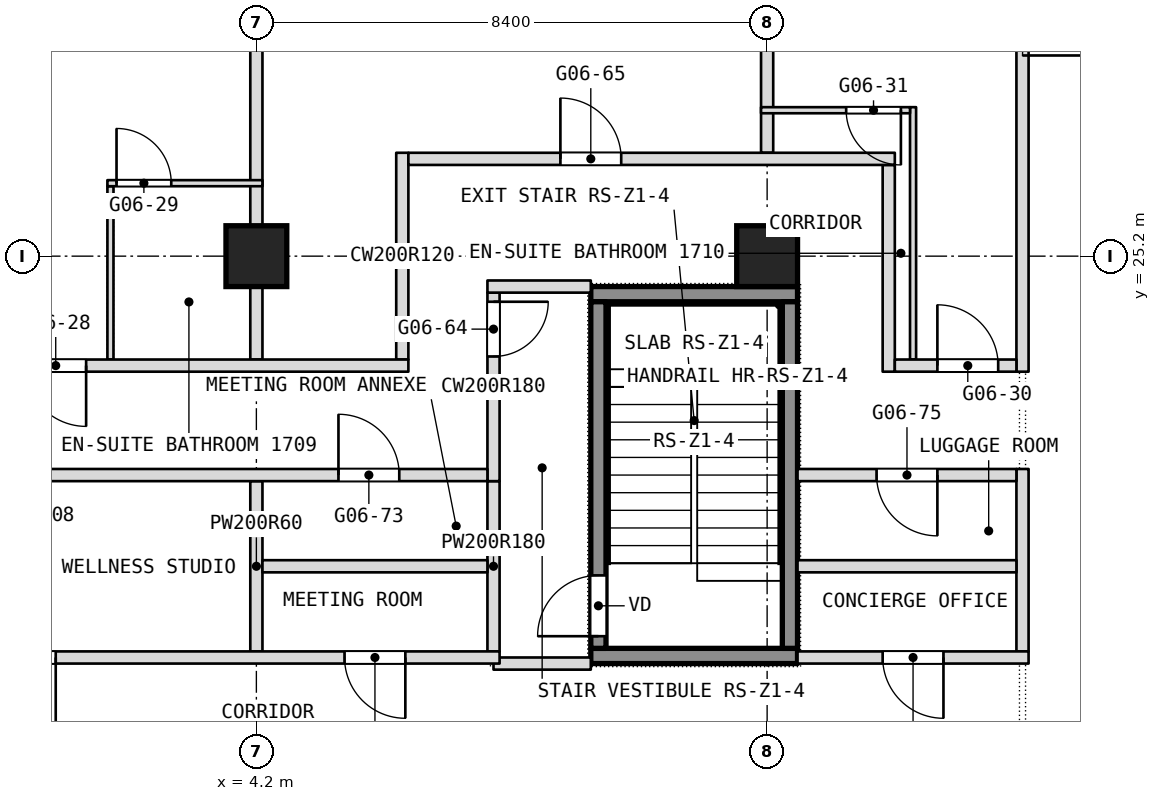
"""IFC4 building model, lengths in metres.
Left out: names, types, materials, properties, quantities, classifications, styles, units other than length and angle.
Written with IfcOpenShell. Run it as: python <this file> out.ifc"""

import sys

from ifc_helpers import new_model, si_unit, direction, frame, frame_2d, origin, origin_2d, place, context, subcontext, project, spatial, rectangle, extrude, element, fill, save


model = new_model("IFC4")
c1 = context("Model", 3, precision=1e-05, world=origin(), true_north=direction((0.0, 1.0)))
c2 = subcontext(c1, "Body", "Model", "MODEL_VIEW")
j1 = project(units=[si_unit("LENGTHUNIT", "METRE"), si_unit("PLANEANGLEUNIT", "RADIAN")], contexts=[c1])
p1 = place(None, origin())
s1 = spatial("IfcSite", under=j1, at=p1, CompositionType="ELEMENT")
p2 = place(p1, origin())
s2 = spatial("IfcBuilding", under=s1, at=p2, CompositionType="ELEMENT")
p3 = place(p2, frame((0.0, 0.0, 76.1)))
s3 = spatial("IfcBuildingStorey", under=s2, at=p3, CompositionType="ELEMENT", Elevation=76.1)
for number, where, z_axis, x_axis in (
    (1, (4.2, 25.2, 0.0), (0.0, 0.0, 1.0), (1.0, 0.0, 0.0)),
    (2, (12.6, 25.2, 0.0), (0.0, 0.0, 1.0), (1.0, 0.0, 0.0)),
):
    element("IfcColumn", number, at=place(p3, frame(where, z_axis=z_axis, x_axis=x_axis)), inside=s3, PredefinedType="COLUMN", context=c2, shape_type="SweptSolid", body=[
        extrude(rectangle(XDim=1.0, YDim=1.0, at=origin_2d()), origin(), (0.0, 0.0, 1.0), 3.6),
    ])
p4 = place(p3, frame((16.8, 18.7, 0.0), z_axis=(0.0, 0.0, 1.0), x_axis=(0.0, 1.0, 0.0)))
e3 = element("IfcWall", 3, at=p4, inside=s3, PredefinedType="PARTITIONING", context=c2, shape_type="SweptSolid", body=[
    extrude(rectangle(XDim=3.0, YDim=0.2, at=frame_2d((1.5, 0.0))), origin(), (0.0, 0.0, 1.0), 3.34),
])
p5 = place(p3, frame((16.8, 23.3, 0.0), z_axis=(0.0, 0.0, 1.0), x_axis=(0.0, 1.0, 0.0)))
e4 = element("IfcWall", 4, at=p5, inside=s3, PredefinedType="PARTITIONING", context=c2, shape_type="SweptSolid", body=[
    extrude(rectangle(XDim=10.24, YDim=0.2, at=frame_2d((5.12, 0.0))), origin(), (0.0, 0.0, 1.0), 3.34),
])
p6 = place(p3, frame((15.0, 23.5, 0.0), z_axis=(0.0, 0.0, 1.0), x_axis=(0.0, 1.0, 0.0)))
e5 = element("IfcWall", 5, at=p6, inside=s3, PredefinedType="PARTITIONING", context=c2, shape_type="SweptSolid", body=[
    extrude(rectangle(XDim=4.15, YDim=0.1, at=frame_2d((2.075, 0.0))), origin(), (0.0, 0.0, 1.0), 3.34),
])
p7 = place(p3, frame((14.6, 23.3, 0.0), z_axis=(0.0, 0.0, 1.0), x_axis=(0.0, 1.0, 0.0)))
e6 = element("IfcWall", 6, at=p7, inside=s3, PredefinedType="PARTITIONING", context=c2, shape_type="SweptSolid", body=[
    extrude(rectangle(XDim=3.4, YDim=0.2, at=frame_2d((1.7, 0.0))), origin(), (0.0, 0.0, 1.0), 3.34),
])
p8 = place(p3, frame((12.6, 26.9, 0.0), z_axis=(0.0, 0.0, 1.0), x_axis=(0.0, 1.0, 0.0)))
e7 = element("IfcWall", 7, at=p8, inside=s3, PredefinedType="PARTITIONING", context=c2, shape_type="SweptSolid", body=[
    extrude(rectangle(XDim=6.64, YDim=0.2, at=frame_2d((3.32, 0.0))), origin(), (0.0, 0.0, 1.0), 3.34),
])
p9 = place(p3, frame((8.1, 18.7, 0.0), z_axis=(0.0, 0.0, 1.0), x_axis=(0.0, 1.0, 0.0)))
e8 = element("IfcWall", 8, at=p9, inside=s3, PredefinedType="PARTITIONING", context=c2, shape_type="SweptSolid", body=[
    extrude(rectangle(XDim=2.8, YDim=0.2, at=frame_2d((1.4, 0.0))), origin(), (0.0, 0.0, 1.0), 3.34),
])
p10 = place(p3, frame((8.1, 21.5, 0.0), z_axis=(0.0, 0.0, 1.0), x_axis=(0.0, 1.0, 0.0)))
e9 = element("IfcWall", 9, at=p10, inside=s3, PredefinedType="PARTITIONING", context=c2, shape_type="SweptSolid", body=[
    extrude(rectangle(XDim=3.1, YDim=0.2, at=frame_2d((1.55, 0.0))), origin(), (0.0, 0.0, 1.0), 3.34),
])
p11 = place(p10, frame((2.05, 0.0, 0.0)))
e10 = element("IfcOpeningElement", 10, at=p11, cuts=e9, PredefinedType="OPENING", context=c2, shape_type="SweptSolid", body=[
    extrude(rectangle(XDim=0.9, YDim=2.1, at=frame_2d((0.45, 1.05))), frame((0.0, 0.1, 0.0), z_axis=(0.0, -1.0, 0.0), x_axis=(1.0, 0.0, 0.0)), (0.0, 0.0, 1.0), 0.2),
])
p12 = place(p3, frame((6.6, 23.5, 0.0), z_axis=(0.0, 0.0, 1.0), x_axis=(0.0, 1.0, 0.0)))
e11 = element("IfcWall", 11, at=p12, inside=s3, PredefinedType="PARTITIONING", context=c2, shape_type="SweptSolid", body=[
    extrude(rectangle(XDim=3.4, YDim=0.2, at=frame_2d((1.7, 0.0))), origin(), (0.0, 0.0, 1.0), 3.34),
])
p13 = place(p3, frame((4.2, 18.7, 0.0), z_axis=(0.0, 0.0, 1.0), x_axis=(0.0, 1.0, 0.0)))
e12 = element("IfcWall", 12, at=p13, inside=s3, PredefinedType="PARTITIONING", context=c2, shape_type="SweptSolid", body=[
    extrude(rectangle(XDim=2.8, YDim=0.2, at=frame_2d((1.4, 0.0))), origin(), (0.0, 0.0, 1.0), 3.34),
])
p14 = place(p3, frame((4.2, 23.5, 0.0), z_axis=(0.0, 0.0, 1.0), x_axis=(0.0, 1.0, 0.0)))
e13 = element("IfcWall", 13, at=p14, inside=s3, PredefinedType="PARTITIONING", context=c2, shape_type="SweptSolid", body=[
    extrude(rectangle(XDim=10.04, YDim=0.2, at=frame_2d((5.02, 0.0))), origin(), (0.0, 0.0, 1.0), 3.34),
])
p15 = place(p3, frame((1.8, 23.5, 0.0), z_axis=(0.0, 0.0, 1.0), x_axis=(0.0, 1.0, 0.0)))
e14 = element("IfcWall", 14, at=p15, inside=s3, PredefinedType="PARTITIONING", context=c2, shape_type="SweptSolid", body=[
    extrude(rectangle(XDim=2.85, YDim=0.1, at=frame_2d((1.425, 0.0))), origin(), (0.0, 0.0, 1.0), 3.34),
])
p16 = place(p3, frame((8.1, 18.5, 0.0), z_axis=(0.0, 0.0, 1.0), x_axis=(1.0, 0.0, 0.0)))
e15 = element("IfcWall", 15, at=p16, inside=s3, PredefinedType="PARTITIONING", context=c2, shape_type="SweptSolid", body=[
    extrude(rectangle(XDim=1.6, YDim=0.2, at=frame_2d((0.8, 0.0))), origin(), (0.0, 0.0, 1.0), 3.34),
])
p17 = place(p3, frame((-16.9, 18.6, 0.0), z_axis=(0.0, 0.0, 1.0), x_axis=(1.0, 0.0, 0.0)))
e16 = element("IfcWall", 16, at=p17, inside=s3, PredefinedType="PARTITIONING", context=c2, shape_type="SweptSolid", body=[
    extrude(rectangle(XDim=25.1, YDim=0.2, at=frame_2d((12.55, 0.0))), origin(), (0.0, 0.0, 1.0), 3.34),
])
p18 = place(p17, frame((16.0, 0.0, 0.0)))
e17 = element("IfcOpeningElement", 17, at=p18, cuts=e16, PredefinedType="OPENING", context=c2, shape_type="SweptSolid", body=[
    extrude(rectangle(XDim=1.8, YDim=2.1, at=frame_2d((0.9, 1.05))), frame((0.0, 0.1, 0.0), z_axis=(0.0, -1.0, 0.0), x_axis=(1.0, 0.0, 0.0)), (0.0, 0.0, 1.0), 0.2),
])
p19 = place(p17, frame((5.9, 0.0, 0.0)))
e18 = element("IfcOpeningElement", 18, at=p19, cuts=e16, PredefinedType="OPENING", context=c2, shape_type="SweptSolid", body=[
    extrude(rectangle(XDim=1.0, YDim=2.1, at=frame_2d((0.5, 1.05))), frame((0.0, 0.1, 0.0), z_axis=(0.0, -1.0, 0.0), x_axis=(1.0, 0.0, 0.0)), (0.0, 0.0, 1.0), 0.2),
])
p20 = place(p17, frame((10.1, 0.0, 0.0)))
e19 = element("IfcOpeningElement", 19, at=p20, cuts=e16, PredefinedType="OPENING", context=c2, shape_type="SweptSolid", body=[
    extrude(rectangle(XDim=1.0, YDim=2.1, at=frame_2d((0.5, 1.05))), frame((0.0, 0.1, 0.0), z_axis=(0.0, -1.0, 0.0), x_axis=(1.0, 0.0, 0.0)), (0.0, 0.0, 1.0), 0.2),
])
p21 = place(p17, frame((1.7, 0.0, 0.0)))
e20 = element("IfcOpeningElement", 20, at=p21, cuts=e16, PredefinedType="OPENING", context=c2, shape_type="SweptSolid", body=[
    extrude(rectangle(XDim=1.0, YDim=2.1, at=frame_2d((0.5, 1.05))), frame((0.0, 0.1, 0.0), z_axis=(0.0, -1.0, 0.0), x_axis=(1.0, 0.0, 0.0)), (0.0, 0.0, 1.0), 0.2),
])
p22 = place(p17, frame((22.55, 0.0, 0.0)))
e21 = element("IfcOpeningElement", 21, at=p22, cuts=e16, PredefinedType="OPENING", context=c2, shape_type="SweptSolid", body=[
    extrude(rectangle(XDim=1.0, YDim=2.1, at=frame_2d((0.5, 1.05))), frame((0.0, 0.1, 0.0), z_axis=(0.0, -1.0, 0.0), x_axis=(1.0, 0.0, 0.0)), (0.0, 0.0, 1.0), 0.2),
])
p23 = place(p3, frame((13.1, 18.6, 0.0), z_axis=(0.0, 0.0, 1.0), x_axis=(1.0, 0.0, 0.0)))
e22 = element("IfcWall", 22, at=p23, inside=s3, PredefinedType="PARTITIONING", context=c2, shape_type="SweptSolid", body=[
    extrude(rectangle(XDim=3.8, YDim=0.2, at=frame_2d((1.9, 0.0))), origin(), (0.0, 0.0, 1.0), 3.34),
])
p24 = place(p23, frame((1.4, 0.0, 0.0)))
e23 = element("IfcOpeningElement", 23, at=p24, cuts=e22, PredefinedType="OPENING", context=c2, shape_type="SweptSolid", body=[
    extrude(rectangle(XDim=1.0, YDim=2.1, at=frame_2d((0.5, 1.05))), frame((0.0, 0.1, 0.0), z_axis=(0.0, -1.0, 0.0), x_axis=(1.0, 0.0, 0.0)), (0.0, 0.0, 1.0), 0.2),
])
p25 = place(p3, frame((4.3, 20.1, 0.0), z_axis=(0.0, 0.0, 1.0), x_axis=(1.0, 0.0, 0.0)))
e24 = element("IfcWall", 24, at=p25, inside=s3, PredefinedType="PARTITIONING", context=c2, shape_type="SweptSolid", body=[
    extrude(rectangle(XDim=3.7, YDim=0.2, at=frame_2d((1.85, 0.0))), origin(), (0.0, 0.0, 1.0), 3.34),
])
p26 = place(p3, frame((13.1, 20.1, 0.0), z_axis=(0.0, 0.0, 1.0), x_axis=(1.0, 0.0, 0.0)))
e25 = element("IfcWall", 25, at=p26, inside=s3, PredefinedType="PARTITIONING", context=c2, shape_type="SweptSolid", body=[
    extrude(rectangle(XDim=3.6, YDim=0.2, at=frame_2d((1.8, 0.0))), origin(), (0.0, 0.0, 1.0), 3.34),
])
p27 = place(p3, frame((-16.7, 21.6, 0.0), z_axis=(0.0, 0.0, 1.0), x_axis=(1.0, 0.0, 0.0)))
e26 = element("IfcWall", 26, at=p27, inside=s3, PredefinedType="PARTITIONING", context=c2, shape_type="SweptSolid", body=[
    extrude(rectangle(XDim=24.7, YDim=0.2, at=frame_2d((12.35, 0.0))), origin(), (0.0, 0.0, 1.0), 3.34),
])
p28 = place(p27, frame((1.6, 0.0, 0.0)))
e27 = element("IfcOpeningElement", 27, at=p28, cuts=e26, PredefinedType="OPENING", context=c2, shape_type="SweptSolid", body=[
    extrude(rectangle(XDim=1.0, YDim=2.1, at=frame_2d((0.5, 1.05))), frame((0.0, 0.1, 0.0), z_axis=(0.0, -1.0, 0.0), x_axis=(1.0, 0.0, 0.0)), (0.0, 0.0, 1.0), 0.2),
])
p29 = place(p27, frame((22.25, 0.0, 0.0)))
e28 = element("IfcOpeningElement", 28, at=p29, cuts=e26, PredefinedType="OPENING", context=c2, shape_type="SweptSolid", body=[
    extrude(rectangle(XDim=1.0, YDim=2.1, at=frame_2d((0.5, 1.05))), frame((0.0, 0.1, 0.0), z_axis=(0.0, -1.0, 0.0), x_axis=(1.0, 0.0, 0.0)), (0.0, 0.0, 1.0), 0.2),
])
p30 = place(p3, frame((13.1, 21.6, 0.0), z_axis=(0.0, 0.0, 1.0), x_axis=(1.0, 0.0, 0.0)))
e29 = element("IfcWall", 29, at=p30, inside=s3, PredefinedType="PARTITIONING", context=c2, shape_type="SweptSolid", body=[
    extrude(rectangle(XDim=3.6, YDim=0.2, at=frame_2d((1.8, 0.0))), origin(), (0.0, 0.0, 1.0), 3.34),
])
p31 = place(p30, frame((1.3, 0.0, 0.0)))
e30 = element("IfcOpeningElement", 30, at=p31, cuts=e29, PredefinedType="OPENING", context=c2, shape_type="SweptSolid", body=[
    extrude(rectangle(XDim=1.0, YDim=2.1, at=frame_2d((0.5, 1.05))), frame((0.0, 0.1, 0.0), z_axis=(0.0, -1.0, 0.0), x_axis=(1.0, 0.0, 0.0)), (0.0, 0.0, 1.0), 0.2),
])
p32 = place(p3, frame((-16.7, 23.4, 0.0), z_axis=(0.0, 0.0, 1.0), x_axis=(1.0, 0.0, 0.0)))
e31 = element("IfcWall", 31, at=p32, inside=s3, PredefinedType="PARTITIONING", context=c2, shape_type="SweptSolid", body=[
    extrude(rectangle(XDim=23.4, YDim=0.2, at=frame_2d((11.7, 0.0))), origin(), (0.0, 0.0, 1.0), 3.34),
])
p33 = place(p32, frame((2.4, 0.0, 0.0)))
e32 = element("IfcOpeningElement", 32, at=p33, cuts=e31, PredefinedType="OPENING", context=c2, shape_type="SweptSolid", body=[
    extrude(rectangle(XDim=0.9, YDim=2.1, at=frame_2d((0.45, 1.05))), frame((0.0, 0.1, 0.0), z_axis=(0.0, -1.0, 0.0), x_axis=(1.0, 0.0, 0.0)), (0.0, 0.0, 1.0), 0.2),
])
p34 = place(p32, frame((5.65, 0.0, 0.0)))
e33 = element("IfcOpeningElement", 33, at=p34, cuts=e31, PredefinedType="OPENING", context=c2, shape_type="SweptSolid", body=[
    extrude(rectangle(XDim=1.1, YDim=2.1, at=frame_2d((0.55, 1.05))), frame((0.0, 0.1, 0.0), z_axis=(0.0, -1.0, 0.0), x_axis=(1.0, 0.0, 0.0)), (0.0, 0.0, 1.0), 0.2),
])
p35 = place(p32, frame((15.3, 0.0, 0.0)))
e34 = element("IfcOpeningElement", 34, at=p35, cuts=e31, PredefinedType="OPENING", context=c2, shape_type="SweptSolid", body=[
    extrude(rectangle(XDim=1.0, YDim=2.1, at=frame_2d((0.5, 1.05))), frame((0.0, 0.1, 0.0), z_axis=(0.0, -1.0, 0.0), x_axis=(1.0, 0.0, 0.0)), (0.0, 0.0, 1.0), 0.2),
])
p36 = place(p32, frame((17.1, 0.0, 0.0)))
e35 = element("IfcOpeningElement", 35, at=p36, cuts=e31, PredefinedType="OPENING", context=c2, shape_type="SweptSolid", body=[
    extrude(rectangle(XDim=1.0, YDim=2.1, at=frame_2d((0.5, 1.05))), frame((0.0, 0.1, 0.0), z_axis=(0.0, -1.0, 0.0), x_axis=(1.0, 0.0, 0.0)), (0.0, 0.0, 1.0), 0.2),
])
p37 = place(p3, frame((14.7, 23.4, 0.0), z_axis=(0.0, 0.0, 1.0), x_axis=(1.0, 0.0, 0.0)))
e36 = element("IfcWall", 36, at=p37, inside=s3, PredefinedType="PARTITIONING", context=c2, shape_type="SweptSolid", body=[
    extrude(rectangle(XDim=2.0, YDim=0.2, at=frame_2d((1.0, 0.0))), origin(), (0.0, 0.0, 1.0), 3.34),
])
p38 = place(p37, frame((0.7, 0.0, 0.0)))
e37 = element("IfcOpeningElement", 37, at=p38, cuts=e36, PredefinedType="OPENING", context=c2, shape_type="SweptSolid", body=[
    extrude(rectangle(XDim=1.0, YDim=2.1, at=frame_2d((0.5, 1.05))), frame((0.0, 0.1, 0.0), z_axis=(0.0, -1.0, 0.0), x_axis=(1.0, 0.0, 0.0)), (0.0, 0.0, 1.0), 0.2),
])
p39 = place(p3, frame((8.0, 24.7, 0.0), z_axis=(0.0, 0.0, 1.0), x_axis=(1.0, 0.0, 0.0)))
e38 = element("IfcWall", 38, at=p39, inside=s3, PredefinedType="PARTITIONING", context=c2, shape_type="SweptSolid", body=[
    extrude(rectangle(XDim=1.7, YDim=0.2, at=frame_2d((0.85, 0.0))), origin(), (0.0, 0.0, 1.0), 3.34),
])
p40 = place(p3, frame((1.75, 26.4, 0.0), z_axis=(0.0, 0.0, 1.0), x_axis=(1.0, 0.0, 0.0)))
e39 = element("IfcWall", 39, at=p40, inside=s3, PredefinedType="PARTITIONING", context=c2, shape_type="SweptSolid", body=[
    extrude(rectangle(XDim=2.55, YDim=0.1, at=frame_2d((1.275, 0.0))), origin(), (0.0, 0.0, 1.0), 3.34),
])
p41 = place(p40, frame((0.15, 0.0, 0.0)))
e40 = element("IfcOpeningElement", 40, at=p41, cuts=e39, PredefinedType="OPENING", context=c2, shape_type="SweptSolid", body=[
    extrude(rectangle(XDim=0.9, YDim=2.1, at=frame_2d((0.45, 1.05))), frame((0.0, 0.05, 0.0), z_axis=(0.0, -1.0, 0.0), x_axis=(1.0, 0.0, 0.0)), (0.0, 0.0, 1.0), 0.1),
])
p42 = place(p3, frame((6.7, 26.8, 0.0), z_axis=(0.0, 0.0, 1.0), x_axis=(1.0, 0.0, 0.0)))
e41 = element("IfcWall", 41, at=p42, inside=s3, PredefinedType="PARTITIONING", context=c2, shape_type="SweptSolid", body=[
    extrude(rectangle(XDim=8.0, YDim=0.2, at=frame_2d((4.0, 0.0))), origin(), (0.0, 0.0, 1.0), 3.34),
])
p43 = place(p42, frame((2.5, 0.0, 0.0)))
e42 = element("IfcOpeningElement", 42, at=p43, cuts=e41, PredefinedType="OPENING", context=c2, shape_type="SweptSolid", body=[
    extrude(rectangle(XDim=1.0, YDim=2.1, at=frame_2d((0.5, 1.05))), frame((0.0, 0.1, 0.0), z_axis=(0.0, -1.0, 0.0), x_axis=(1.0, 0.0, 0.0)), (0.0, 0.0, 1.0), 0.2),
])
p44 = place(p3, frame((12.5, 27.6, 0.0), z_axis=(0.0, 0.0, 1.0), x_axis=(1.0, 0.0, 0.0)))
e43 = element("IfcWall", 43, at=p44, inside=s3, PredefinedType="PARTITIONING", context=c2, shape_type="SweptSolid", body=[
    extrude(rectangle(XDim=2.45, YDim=0.1, at=frame_2d((1.225, 0.0))), origin(), (0.0, 0.0, 1.0), 3.34),
])
p45 = place(p44, frame((1.4, 0.0, 0.0)))
e44 = element("IfcOpeningElement", 44, at=p45, cuts=e43, PredefinedType="OPENING", context=c2, shape_type="SweptSolid", body=[
    extrude(rectangle(XDim=0.9, YDim=2.1, at=frame_2d((0.45, 1.05))), frame((0.0, 0.05, 0.0), z_axis=(0.0, -1.0, 0.0), x_axis=(1.0, 0.0, 0.0)), (0.0, 0.0, 1.0), 0.1),
])
for number, where, z_axis, x_axis in (
    (45, (9.7, 18.625, 0.1), (0.0, 0.0, 1.0), (1.0, 0.0, 0.0)),
    (46, (9.7, 24.575, 0.1), (0.0, 0.0, 1.0), (1.0, 0.0, 0.0)),
):
    element("IfcWall", number, at=place(p3, frame(where, z_axis=z_axis, x_axis=x_axis)), inside=s3, PredefinedType="SHEAR", context=c2, shape_type="SweptSolid", body=[
        extrude(rectangle(XDim=3.4, YDim=0.25, at=frame_2d((1.7, 0.0))), origin(), (0.0, 0.0, 1.0), 3.6),
    ])
p46 = place(p3, frame((9.825, 18.75, 0.1), z_axis=(0.0, 0.0, 1.0), x_axis=(0.0, 1.0, 0.0)))
e47 = element("IfcWall", 47, at=p46, inside=s3, PredefinedType="SHEAR", context=c2, shape_type="SweptSolid", body=[
    extrude(rectangle(XDim=5.7, YDim=0.25, at=frame_2d((2.85, 0.0))), origin(), (0.0, 0.0, 1.0), 3.6),
])
p47 = place(p46, frame((0.2, 0.0, 0.0)))
e48 = element("IfcOpeningElement", 48, at=p47, cuts=e47, PredefinedType="OPENING", context=c2, shape_type="SweptSolid", body=[
    extrude(rectangle(XDim=1.0, YDim=2.1, at=frame_2d((0.5, 1.05))), frame((0.0, 0.125, 0.0), z_axis=(0.0, -1.0, 0.0), x_axis=(1.0, 0.0, 0.0)), (0.0, 0.0, 1.0), 0.25),
])
p48 = place(p3, frame((12.975, 18.75, 0.1), z_axis=(0.0, 0.0, 1.0), x_axis=(0.0, 1.0, 0.0)))
e49 = element("IfcWall", 49, at=p48, inside=s3, PredefinedType="SHEAR", context=c2, shape_type="SweptSolid", body=[
    extrude(rectangle(XDim=5.7, YDim=0.25, at=frame_2d((2.85, 0.0))), origin(), (0.0, 0.0, 1.0), 3.6),
])
p49 = place(p11, origin())
e50 = element("IfcDoor", 50, at=p49, inside=s3, OperationType="SINGLE_SWING_LEFT", PredefinedType="DOOR", context=c2, shape_type="SweptSolid", body=[
    extrude(rectangle(XDim=0.9, YDim=2.1, at=frame_2d((0.45, 1.05))), frame((0.0, 0.025, 0.0), z_axis=(0.0, -1.0, 0.0), x_axis=(1.0, 0.0, 0.0)), (0.0, 0.0, 1.0), 0.05),
])
fill(e10, e50)
p50 = place(p18, origin())
e51 = element("IfcDoor", 51, at=p50, inside=s3, OperationType="DOUBLE_DOOR_SINGLE_SWING", PredefinedType="DOOR", context=c2, shape_type="SweptSolid", body=[
    extrude(rectangle(XDim=1.8, YDim=2.1, at=frame_2d((0.9, 1.05))), frame((0.0, 0.025, 0.0), z_axis=(0.0, -1.0, 0.0), x_axis=(1.0, 0.0, 0.0)), (0.0, 0.0, 1.0), 0.05),
])
fill(e17, e51)
p51 = place(p22, origin())
e52 = element("IfcDoor", 52, at=p51, inside=s3, OperationType="SINGLE_SWING_RIGHT", PredefinedType="DOOR", context=c2, shape_type="SweptSolid", body=[
    extrude(rectangle(XDim=1.0, YDim=2.1, at=frame_2d((0.5, 1.05))), frame((0.0, 0.025, 0.0), z_axis=(0.0, -1.0, 0.0), x_axis=(1.0, 0.0, 0.0)), (0.0, 0.0, 1.0), 0.05),
])
fill(e21, e52)
p52 = place(p24, origin())
e53 = element("IfcDoor", 53, at=p52, inside=s3, OperationType="SINGLE_SWING_LEFT", PredefinedType="DOOR", context=c2, shape_type="SweptSolid", body=[
    extrude(rectangle(XDim=1.0, YDim=2.1, at=frame_2d((0.5, 1.05))), frame((0.0, 0.025, 0.0), z_axis=(0.0, -1.0, 0.0), x_axis=(1.0, 0.0, 0.0)), (0.0, 0.0, 1.0), 0.05),
])
fill(e23, e53)
p53 = place(p29, origin())
e54 = element("IfcDoor", 54, at=p53, inside=s3, OperationType="SINGLE_SWING_LEFT", PredefinedType="DOOR", context=c2, shape_type="SweptSolid", body=[
    extrude(rectangle(XDim=1.0, YDim=2.1, at=frame_2d((0.5, 1.05))), frame((0.0, 0.025, 0.0), z_axis=(0.0, -1.0, 0.0), x_axis=(1.0, 0.0, 0.0)), (0.0, 0.0, 1.0), 0.05),
])
fill(e28, e54)
p54 = place(p31, origin())
e55 = element("IfcDoor", 55, at=p54, inside=s3, OperationType="SINGLE_SWING_RIGHT", PredefinedType="DOOR", context=c2, shape_type="SweptSolid", body=[
    extrude(rectangle(XDim=1.0, YDim=2.1, at=frame_2d((0.5, 1.05))), frame((0.0, 0.025, 0.0), z_axis=(0.0, -1.0, 0.0), x_axis=(1.0, 0.0, 0.0)), (0.0, 0.0, 1.0), 0.05),
])
fill(e30, e55)
p55 = place(p36, origin())
e56 = element("IfcDoor", 56, at=p55, inside=s3, OperationType="SINGLE_SWING_LEFT", PredefinedType="DOOR", context=c2, shape_type="SweptSolid", body=[
    extrude(rectangle(XDim=1.0, YDim=2.1, at=frame_2d((0.5, 1.05))), frame((0.0, 0.025, 0.0), z_axis=(0.0, -1.0, 0.0), x_axis=(1.0, 0.0, 0.0)), (0.0, 0.0, 1.0), 0.05),
])
fill(e35, e56)
p56 = place(p38, origin())
e57 = element("IfcDoor", 57, at=p56, inside=s3, OperationType="SINGLE_SWING_RIGHT", PredefinedType="DOOR", context=c2, shape_type="SweptSolid", body=[
    extrude(rectangle(XDim=1.0, YDim=2.1, at=frame_2d((0.5, 1.05))), frame((0.0, 0.025, 0.0), z_axis=(0.0, -1.0, 0.0), x_axis=(1.0, 0.0, 0.0)), (0.0, 0.0, 1.0), 0.05),
])
fill(e37, e57)
p57 = place(p41, origin())
e58 = element("IfcDoor", 58, at=p57, inside=s3, OperationType="SINGLE_SWING_RIGHT", PredefinedType="DOOR", context=c2, shape_type="SweptSolid", body=[
    extrude(rectangle(XDim=0.9, YDim=2.1, at=frame_2d((0.45, 1.05))), frame((0.0, 0.025, 0.0), z_axis=(0.0, -1.0, 0.0), x_axis=(1.0, 0.0, 0.0)), (0.0, 0.0, 1.0), 0.05),
])
fill(e40, e58)
p58 = place(p43, origin())
e59 = element("IfcDoor", 59, at=p58, inside=s3, OperationType="SINGLE_SWING_LEFT", PredefinedType="DOOR", context=c2, shape_type="SweptSolid", body=[
    extrude(rectangle(XDim=1.0, YDim=2.1, at=frame_2d((0.5, 1.05))), frame((0.0, 0.025, 0.0), z_axis=(0.0, -1.0, 0.0), x_axis=(1.0, 0.0, 0.0)), (0.0, 0.0, 1.0), 0.05),
])
fill(e42, e59)
p59 = place(p45, origin())
e60 = element("IfcDoor", 60, at=p59, inside=s3, OperationType="SINGLE_SWING_LEFT", PredefinedType="DOOR", context=c2, shape_type="SweptSolid", body=[
    extrude(rectangle(XDim=0.9, YDim=2.1, at=frame_2d((0.45, 1.05))), frame((0.0, 0.025, 0.0), z_axis=(0.0, -1.0, 0.0), x_axis=(1.0, 0.0, 0.0)), (0.0, 0.0, 1.0), 0.05),
])
fill(e44, e60)
p60 = place(p47, origin())
e61 = element("IfcDoor", 61, at=p60, inside=s3, OperationType="SINGLE_SWING_LEFT", PredefinedType="DOOR", context=c2, shape_type="SweptSolid", body=[
    extrude(rectangle(XDim=1.0, YDim=2.1, at=frame_2d((0.5, 1.05))), frame((0.0, 0.025, 0.0), z_axis=(0.0, -1.0, 0.0), x_axis=(1.0, 0.0, 0.0)), (0.0, 0.0, 1.0), 0.05),
])
fill(e48, e61)
save(model, sys.argv[1])
